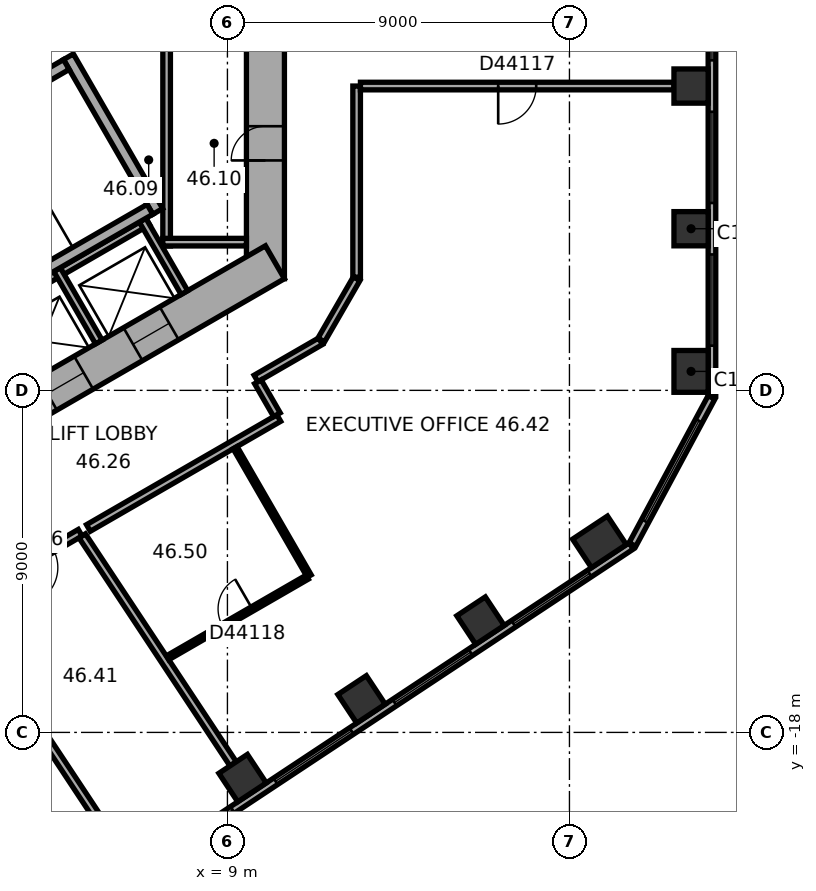
"""IFC4 building model, lengths in metres.
Left out: names, types, materials, properties, quantities, classifications, styles, units other than length and angle.
Written with IfcOpenShell. Run it as: python <this file> out.ifc"""

import sys

from ifc_helpers import new_model, si_unit, direction, frame, frame_2d, origin, origin_2d, place, context, subcontext, project, spatial, rectangle, extrude, element, fill, save


model = new_model("IFC4")
c1 = context("Model", 3, precision=1e-05, world=origin(), true_north=direction((0.0, 1.0)))
c2 = subcontext(c1, "Body", "Model", "MODEL_VIEW")
j1 = project(units=[si_unit("LENGTHUNIT", "METRE"), si_unit("PLANEANGLEUNIT", "RADIAN")], contexts=[c1])
p1 = place(None, origin())
s1 = spatial("IfcSite", under=j1, at=p1, CompositionType="ELEMENT")
p2 = place(p1, origin())
s2 = spatial("IfcBuilding", under=s1, at=p2, CompositionType="ELEMENT")
p3 = place(p2, frame((0.0, 0.0, 187.3)))
s3 = spatial("IfcBuildingStorey", under=s2, at=p3, CompositionType="ELEMENT", Elevation=187.3)
p4 = place(p3, frame((21.2, -8.501, 0.0), z_axis=(0.0, 0.0, 1.0), x_axis=(0.0, 1.0, 0.0)))
e1 = element("IfcColumn", 1, at=p4, inside=s3, PredefinedType="COLUMN", context=c2, shape_type="SweptSolid", body=[
    extrude(rectangle(XDim=1.1, YDim=0.9, at=origin_2d()), origin(), (0.0, 0.0, 1.0), 3.7),
])
for number, where, z_axis, x_axis in (
    (2, (21.2, -4.747, 0.0), (0.0, 0.0, 1.0), (0.0, 1.0, 0.0)),
    (3, (21.2, -0.993, 0.0), (0.0, 0.0, 1.0), (0.0, 1.0, 0.0)),
    (4, (9.398, -19.202, 0.0), (0.0, 0.0, 1.0), (0.834, 0.552, 0.0)),
    (5, (12.529, -17.13, 0.0), (0.0, 0.0, 1.0), (0.834, 0.552, 0.0)),
    (6, (15.659, -15.058, 0.0), (0.0, 0.0, 1.0), (0.834, 0.552, 0.0)),
):
    element("IfcColumn", number, at=place(p3, frame(where, z_axis=z_axis, x_axis=x_axis)), inside=s3, PredefinedType="COLUMN", context=c2, shape_type="SweptSolid", body=[
        extrude(rectangle(XDim=0.9, YDim=0.9, at=origin_2d()), origin(), (0.0, 0.0, 1.0), 3.7),
    ])
p5 = place(p3, frame((18.79, -12.986, 0.0), z_axis=(0.0, 0.0, 1.0), x_axis=(0.833885822067, 0.551936985312, 0.0)))
e7 = element("IfcColumn", 7, at=p5, inside=s3, PredefinedType="COLUMN", context=c2, shape_type="SweptSolid", body=[
    extrude(rectangle(XDim=1.1, YDim=0.9, at=origin_2d()), origin(), (0.0, 0.0, 1.0), 3.7),
])
p6 = place(p3, frame((10.0, -6.062, 0.0), z_axis=(0.0, 0.0, 1.0), x_axis=(0.0, 1.0, 0.0)))
e8 = element("IfcWall", 8, at=p6, inside=s3, PredefinedType="SHEAR", context=c2, shape_type="SweptSolid", body=[
    extrude(rectangle(XDim=12.125, YDim=1.0, at=frame_2d((6.062, 0.0))), origin(), (0.0, 0.0, 1.0), 3.7),
])
p7 = place(p6, frame((6.262, 0.0, 0.0)))
e9 = element("IfcOpeningElement", 9, at=p7, cuts=e8, PredefinedType="OPENING", context=c2, shape_type="SweptSolid", body=[
    extrude(rectangle(XDim=1.5, YDim=2.1, at=frame_2d((0.75, 1.05))), frame((0.0, 0.51, 0.0), z_axis=(0.0, -1.0, 0.0), x_axis=(1.0, 0.0, 0.0)), (0.0, 0.0, 1.0), 1.02),
])
p8 = place(p6, frame((3.112, 0.0, 0.0)))
e10 = element("IfcOpeningElement", 10, at=p8, cuts=e8, PredefinedType="OPENING", context=c2, shape_type="SweptSolid", body=[
    extrude(rectangle(XDim=0.9, YDim=2.1, at=frame_2d((0.45, 1.05))), frame((0.0, 0.51, 0.0), z_axis=(0.0, -1.0, 0.0), x_axis=(1.0, 0.0, 0.0)), (0.0, 0.0, 1.0), 1.02),
])
p9 = place(p3, frame((-0.25, -11.691, 0.0), z_axis=(0.0, 0.0, 1.0), x_axis=(0.866022616891, 0.50000482701, 0.0)))
e11 = element("IfcWall", 11, at=p9, inside=s3, PredefinedType="SHEAR", context=c2, shape_type="SweptSolid", body=[
    extrude(rectangle(XDim=12.125, YDim=1.0, at=frame_2d((6.062, 0.0))), origin(), (0.0, 0.0, 1.0), 3.7),
])
p10 = place(p9, frame((2.612, 0.0, 0.0)))
e12 = element("IfcOpeningElement", 12, at=p10, cuts=e11, PredefinedType="OPENING", context=c2, shape_type="SweptSolid", body=[
    extrude(rectangle(XDim=1.1, YDim=2.1, at=frame_2d((0.55, 1.05))), frame((0.0, 0.51, 0.0), z_axis=(0.0, -1.0, 0.0), x_axis=(1.0, 0.0, 0.0)), (0.0, 0.0, 1.0), 1.02),
])
p11 = place(p9, frame((5.212, 0.0, 0.0)))
e13 = element("IfcOpeningElement", 13, at=p11, cuts=e11, PredefinedType="OPENING", context=c2, shape_type="SweptSolid", body=[
    extrude(rectangle(XDim=1.1, YDim=2.1, at=frame_2d((0.55, 1.05))), frame((0.0, 0.51, 0.0), z_axis=(0.0, -1.0, 0.0), x_axis=(1.0, 0.0, 0.0)), (0.0, 0.0, 1.0), 1.02),
])
p12 = place(p9, frame((7.812, 0.0, 0.0)))
e14 = element("IfcOpeningElement", 14, at=p12, cuts=e11, PredefinedType="OPENING", context=c2, shape_type="SweptSolid", body=[
    extrude(rectangle(XDim=1.1, YDim=2.1, at=frame_2d((0.55, 1.05))), frame((0.0, 0.51, 0.0), z_axis=(0.0, -1.0, 0.0), x_axis=(1.0, 0.0, 0.0)), (0.0, 0.0, 1.0), 1.02),
])
p13 = place(p3, frame((21.75, -9.138, 0.0), z_axis=(0.0, 0.0, 1.0), x_axis=(0.0, 1.0, 0.0)))
e15 = element("IfcWall", 15, at=p13, inside=s3, PredefinedType="STANDARD", context=c2, shape_type="SweptSolid", body=[
    extrude(rectangle(XDim=20.044, YDim=0.2, at=frame_2d((10.022, 0.0))), origin(), (0.0, 0.0, 1.0), 3.7),
])
p14 = place(p13, frame((1.314, 0.0, 0.9)))
e16 = element("IfcOpeningElement", 16, at=p14, cuts=e15, PredefinedType="OPENING", context=c2, shape_type="SweptSolid", body=[
    extrude(rectangle(XDim=2.4, YDim=2.0, at=frame_2d((1.2, 1.0))), frame((0.0, 0.11, 0.0), z_axis=(0.0, -1.0, 0.0), x_axis=(1.0, 0.0, 0.0)), (0.0, 0.0, 1.0), 0.22),
])
p15 = place(p13, frame((5.069, 0.0, 0.9)))
e17 = element("IfcOpeningElement", 17, at=p15, cuts=e15, PredefinedType="OPENING", context=c2, shape_type="SweptSolid", body=[
    extrude(rectangle(XDim=2.4, YDim=2.0, at=frame_2d((1.2, 1.0))), frame((0.0, 0.11, 0.0), z_axis=(0.0, -1.0, 0.0), x_axis=(1.0, 0.0, 0.0)), (0.0, 0.0, 1.0), 0.22),
])
p16 = place(p13, frame((8.823, 0.0, 0.9)))
e18 = element("IfcOpeningElement", 18, at=p16, cuts=e15, PredefinedType="OPENING", context=c2, shape_type="SweptSolid", body=[
    extrude(rectangle(XDim=2.4, YDim=2.0, at=frame_2d((1.2, 1.0))), frame((0.0, 0.11, 0.0), z_axis=(0.0, -1.0, 0.0), x_axis=(1.0, 0.0, 0.0)), (0.0, 0.0, 1.0), 0.22),
])
p17 = place(p13, frame((12.577, 0.0, 0.9)))
e19 = element("IfcOpeningElement", 19, at=p17, cuts=e15, PredefinedType="OPENING", context=c2, shape_type="SweptSolid", body=[
    extrude(rectangle(XDim=2.4, YDim=2.0, at=frame_2d((1.2, 1.0))), frame((0.0, 0.11, 0.0), z_axis=(0.0, -1.0, 0.0), x_axis=(1.0, 0.0, 0.0)), (0.0, 0.0, 1.0), 0.22),
])
p18 = place(p13, frame((16.331, 0.0, 0.9)))
e20 = element("IfcOpeningElement", 20, at=p18, cuts=e15, PredefinedType="OPENING", context=c2, shape_type="SweptSolid", body=[
    extrude(rectangle(XDim=2.4, YDim=2.0, at=frame_2d((1.2, 1.0))), frame((0.0, 0.11, 0.0), z_axis=(0.0, -1.0, 0.0), x_axis=(1.0, 0.0, 0.0)), (0.0, 0.0, 1.0), 0.22),
])
p19 = place(p3, frame((2.911, -24.156, 0.0), z_axis=(0.0, 0.0, 1.0), x_axis=(0.833882163564, 0.551942512668, 0.0)))
e21 = element("IfcWall", 21, at=p19, inside=s3, PredefinedType="STANDARD", context=c2, shape_type="SweptSolid", body=[
    extrude(rectangle(XDim=20.044, YDim=0.2, at=frame_2d((10.022, 0.0))), origin(), (0.0, 0.0, 1.0), 3.7),
])
p20 = place(p19, frame((1.313, 0.0, 0.9)))
e22 = element("IfcOpeningElement", 22, at=p20, cuts=e21, PredefinedType="OPENING", context=c2, shape_type="SweptSolid", body=[
    extrude(rectangle(XDim=2.4, YDim=2.0, at=frame_2d((1.2, 1.0))), frame((0.0, 0.11, 0.0), z_axis=(0.0, -1.0, 0.0), x_axis=(1.0, 0.0, 0.0)), (0.0, 0.0, 1.0), 0.22),
])
p21 = place(p19, frame((5.067, 0.0, 0.9)))
e23 = element("IfcOpeningElement", 23, at=p21, cuts=e21, PredefinedType="OPENING", context=c2, shape_type="SweptSolid", body=[
    extrude(rectangle(XDim=2.4, YDim=2.0, at=frame_2d((1.2, 1.0))), frame((0.0, 0.11, 0.0), z_axis=(0.0, -1.0, 0.0), x_axis=(1.0, 0.0, 0.0)), (0.0, 0.0, 1.0), 0.22),
])
p22 = place(p19, frame((8.821, 0.0, 0.9)))
e24 = element("IfcOpeningElement", 24, at=p22, cuts=e21, PredefinedType="OPENING", context=c2, shape_type="SweptSolid", body=[
    extrude(rectangle(XDim=2.4, YDim=2.0, at=frame_2d((1.2, 1.0))), frame((0.0, 0.11, 0.0), z_axis=(0.0, -1.0, 0.0), x_axis=(1.0, 0.0, 0.0)), (0.0, 0.0, 1.0), 0.22),
])
p23 = place(p19, frame((12.575, 0.0, 0.9)))
e25 = element("IfcOpeningElement", 25, at=p23, cuts=e21, PredefinedType="OPENING", context=c2, shape_type="SweptSolid", body=[
    extrude(rectangle(XDim=2.4, YDim=2.0, at=frame_2d((1.2, 1.0))), frame((0.0, 0.11, 0.0), z_axis=(0.0, -1.0, 0.0), x_axis=(1.0, 0.0, 0.0)), (0.0, 0.0, 1.0), 0.22),
])
p24 = place(p19, frame((16.329, 0.0, 0.9)))
e26 = element("IfcOpeningElement", 26, at=p24, cuts=e21, PredefinedType="OPENING", context=c2, shape_type="SweptSolid", body=[
    extrude(rectangle(XDim=2.4, YDim=2.0, at=frame_2d((1.2, 1.0))), frame((0.0, 0.11, 0.0), z_axis=(0.0, -1.0, 0.0), x_axis=(1.0, 0.0, 0.0)), (0.0, 0.0, 1.0), 0.22),
])
p25 = place(p3, frame((19.658, -13.057, 0.0), z_axis=(0.0, 0.0, 1.0), x_axis=(0.473307879841, 0.880897071672, 0.0)))
e27 = element("IfcWall", 27, at=p25, inside=s3, PredefinedType="STANDARD", context=c2, shape_type="SweptSolid", body=[
    extrude(rectangle(XDim=4.395, YDim=0.2, at=frame_2d((2.197, 0.0))), origin(), (0.0, 0.0, 1.0), 3.7),
])
p26 = place(p25, frame((0.698, 0.0, 0.9)))
e28 = element("IfcOpeningElement", 28, at=p26, cuts=e27, PredefinedType="OPENING", context=c2, shape_type="SweptSolid", body=[
    extrude(rectangle(XDim=3.0, YDim=2.0, at=frame_2d((1.5, 1.0))), frame((0.0, 0.11, 0.0), z_axis=(0.0, -1.0, 0.0), x_axis=(1.0, 0.0, 0.0)), (0.0, 0.0, 1.0), 0.22),
])
p27 = place(p3, frame((7.4, -5.2, 0.0), z_axis=(0.0, 0.0, 1.0), x_axis=(0.0, 1.0, 0.0)))
e29 = element("IfcWall", 29, at=p27, inside=s3, PredefinedType="PARTITIONING", context=c2, shape_type="SweptSolid", body=[
    extrude(rectangle(XDim=5.4, YDim=0.2, at=frame_2d((2.7, 0.0))), origin(), (0.0, 0.0, 1.0), 3.42),
])
p28 = place(p3, frame((7.3, -5.1, 0.0), z_axis=(0.0, 0.0, 1.0), x_axis=(1.0, 0.0, 0.0)))
e30 = element("IfcWall", 30, at=p28, inside=s3, PredefinedType="PARTITIONING", context=c2, shape_type="SweptSolid", body=[
    extrude(rectangle(XDim=2.2, YDim=0.2, at=frame_2d((1.1, 0.0))), origin(), (0.0, 0.0, 1.0), 3.42),
])
p29 = place(p3, frame((-0.024, -8.559, 0.0), z_axis=(0.0, 0.0, 1.0), x_axis=(0.866026010844, 0.49999894854, 0.0)))
e31 = element("IfcWall", 31, at=p29, inside=s3, PredefinedType="PARTITIONING", context=c2, shape_type="SweptSolid", body=[
    extrude(rectangle(XDim=8.0, YDim=0.2, at=frame_2d((4.0, 0.0))), origin(), (0.0, 0.0, 1.0), 3.42),
])
for number, where, z_axis, x_axis in (
    (32, (4.516, -5.822, 0.0), (0.0, 0.0, 1.0), (0.5, -0.866, 0.0)),
    (33, (6.768, -4.522, 0.0), (0.0, 0.0, 1.0), (0.5, -0.866, 0.0)),
):
    element("IfcWall", number, at=place(p3, frame(where, z_axis=z_axis, x_axis=x_axis)), inside=s3, PredefinedType="PARTITIONING", context=c2, shape_type="SweptSolid", body=[
        extrude(rectangle(XDim=2.2, YDim=0.2, at=frame_2d((1.1, 0.0))), origin(), (0.0, 0.0, 1.0), 3.42),
    ])
p30 = place(p3, frame((4.816, -0.222, 0.0), z_axis=(0.0, 0.0, 1.0), x_axis=(0.499977259774, -0.866038532462, 0.0)))
e34 = element("IfcWall", 34, at=p30, inside=s3, PredefinedType="SHEAR", context=c2, shape_type="SweptSolid", body=[
    extrude(rectangle(XDim=4.7, YDim=0.3, at=frame_2d((2.35, 0.0))), origin(), (0.0, 0.0, 1.0), 3.42),
])
for number, where, z_axis, x_axis in (
    (35, (-1.353, -3.957, 0.0), (0.0, 0.0, 1.0), (0.866, 0.5, 0.0)),
    (36, (0.847, -7.767, 0.0), (0.0, 0.0, 1.0), (0.866, 0.5, 0.0)),
):
    element("IfcWall", number, at=place(p3, frame(where, z_axis=z_axis, x_axis=x_axis)), inside=s3, PredefinedType="SHEAR", context=c2, shape_type="SweptSolid", body=[
        extrude(rectangle(XDim=7.06, YDim=0.3, at=frame_2d((3.53, 0.0))), origin(), (0.0, 0.0, 1.0), 3.42),
    ])
p31 = place(p3, frame((2.816, -14.079, 0.0), z_axis=(0.0, 0.0, 1.0), x_axis=(0.866008705299, 0.50002892151, 0.0)))
e37 = element("IfcWall", 37, at=p31, inside=s3, PredefinedType="PARTITIONING", context=c2, shape_type="SweptSolid", body=[
    extrude(rectangle(XDim=2.666, YDim=0.2, at=frame_2d((1.333, 0.0))), origin(), (0.0, 0.0, 1.0), 3.42),
])
p32 = place(p31, frame((0.833, 0.0, 0.0)))
e38 = element("IfcOpeningElement", 38, at=p32, cuts=e37, PredefinedType="OPENING", context=c2, shape_type="SweptSolid", body=[
    extrude(rectangle(XDim=1.0, YDim=2.1, at=frame_2d((0.5, 1.05))), frame((0.0, 0.11, 0.0), z_axis=(0.0, -1.0, 0.0), x_axis=(1.0, 0.0, 0.0)), (0.0, 0.0, 1.0), 0.22),
])
p33 = place(p3, frame((5.342, -12.621, 0.0), z_axis=(0.0, 0.0, 1.0), x_axis=(0.866024665123, 0.500001279396, 0.0)))
e39 = element("IfcWall", 39, at=p33, inside=s3, PredefinedType="PARTITIONING", context=c2, shape_type="SweptSolid", body=[
    extrude(rectangle(XDim=5.786, YDim=0.2, at=frame_2d((2.893, 0.0))), origin(), (0.0, 0.0, 1.0), 3.42),
])
p34 = place(p3, frame((6.02, -20.899, 0.0), z_axis=(0.0, 0.0, 1.0), x_axis=(-0.551943990108, 0.833881185651, 0.0)))
e40 = element("IfcWall", 40, at=p34, inside=s3, PredefinedType="PARTITIONING", context=c2, shape_type="SweptSolid", body=[
    extrude(rectangle(XDim=8.615, YDim=0.2, at=frame_2d((4.308, 0.0))), origin(), (0.0, 0.0, 1.0), 3.42),
])
p35 = place(p3, frame((9.15, -18.827, 0.0), z_axis=(0.0, 0.0, 1.0), x_axis=(-0.551939801345, 0.833883958169, 0.0)))
e41 = element("IfcWall", 41, at=p35, inside=s3, PredefinedType="PARTITIONING", context=c2, shape_type="SweptSolid", body=[
    extrude(rectangle(XDim=7.192, YDim=0.2, at=frame_2d((3.596, 0.0))), origin(), (0.0, 0.0, 1.0), 2.87),
])
p36 = place(p3, frame((9.202, -10.508, 0.0), z_axis=(0.0, 0.0, 1.0), x_axis=(0.500043961785, -0.866000020948, 0.0)))
e42 = element("IfcWall", 42, at=p36, inside=s3, PredefinedType="PARTITIONING", context=c2, shape_type="SweptSolid", body=[
    extrude(rectangle(XDim=3.9, YDim=0.12, at=frame_2d((1.95, 0.0))), origin(), (0.0, 0.0, 1.0), 3.42),
])
p37 = place(p3, frame((9.752, -8.688, 0.0), z_axis=(0.0, 0.0, 1.0), x_axis=(0.865974105138, 0.500088841337, 0.0)))
e43 = element("IfcWall", 43, at=p37, inside=s3, PredefinedType="PARTITIONING", context=c2, shape_type="SweptSolid", body=[
    extrude(rectangle(XDim=1.961, YDim=0.2, at=frame_2d((0.98, 0.0))), origin(), (0.0, 0.0, 1.0), 3.42),
])
p38 = place(p3, frame((10.302, -9.642, 0.0), z_axis=(0.0, 0.0, 1.0), x_axis=(-0.500074377092, 0.865982457891, 0.0)))
e44 = element("IfcWall", 44, at=p38, inside=s3, PredefinedType="PARTITIONING", context=c2, shape_type="SweptSolid", body=[
    extrude(rectangle(XDim=1.001, YDim=0.2, at=frame_2d((0.5, 0.0))), origin(), (0.0, 0.0, 1.0), 3.42),
])
p39 = place(p3, frame((11.1, -13.915, 0.0), z_axis=(0.0, 0.0, 1.0), x_axis=(-0.866048475386, -0.499960036685, 0.0)))
e45 = element("IfcWall", 45, at=p39, inside=s3, PredefinedType="PARTITIONING", context=c2, shape_type="SweptSolid", body=[
    extrude(rectangle(XDim=4.24, YDim=0.12, at=frame_2d((2.12, 0.0))), origin(), (0.0, 0.0, 1.0), 3.42),
])
p40 = place(p39, frame((1.67, 0.0, 0.0)))
e46 = element("IfcOpeningElement", 46, at=p40, cuts=e45, PredefinedType="OPENING", context=c2, shape_type="SweptSolid", body=[
    extrude(rectangle(XDim=0.9, YDim=2.1, at=frame_2d((0.45, 1.05))), frame((0.0, 0.07, 0.0), z_axis=(0.0, -1.0, 0.0), x_axis=(1.0, 0.0, 0.0)), (0.0, 0.0, 1.0), 0.14),
])
p41 = place(p3, frame((11.47, -7.673, 0.0), z_axis=(0.0, 0.0, 1.0), x_axis=(0.499964847546, 0.866045698112, 0.0)))
e47 = element("IfcWall", 47, at=p41, inside=s3, PredefinedType="PARTITIONING", context=c2, shape_type="SweptSolid", body=[
    extrude(rectangle(XDim=1.86, YDim=0.2, at=frame_2d((0.93, 0.0))), origin(), (0.0, 0.0, 1.0), 3.42),
])
p42 = place(p3, frame((12.4, -6.022, 0.0), z_axis=(0.0, 0.0, 1.0), x_axis=(0.0, 1.0, 0.0)))
e48 = element("IfcWall", 48, at=p42, inside=s3, PredefinedType="PARTITIONING", context=c2, shape_type="SweptSolid", body=[
    extrude(rectangle(XDim=5.029, YDim=0.2, at=frame_2d((2.515, 0.0))), origin(), (0.0, 0.0, 1.0), 3.42),
])
p43 = place(p3, frame((12.5, -0.993, 0.0), z_axis=(0.0, 0.0, 1.0), x_axis=(1.0, 0.0, 0.0)))
e49 = element("IfcWall", 49, at=p43, inside=s3, PredefinedType="PARTITIONING", context=c2, shape_type="SweptSolid", body=[
    extrude(rectangle(XDim=8.25, YDim=0.2, at=frame_2d((4.125, 0.0))), origin(), (0.0, 0.0, 1.0), 2.87),
])
p44 = place(p43, frame((3.625, 0.0, 0.0)))
e50 = element("IfcOpeningElement", 50, at=p44, cuts=e49, PredefinedType="OPENING", context=c2, shape_type="SweptSolid", body=[
    extrude(rectangle(XDim=1.0, YDim=2.1, at=frame_2d((0.5, 1.05))), frame((0.0, 0.11, 0.0), z_axis=(0.0, -1.0, 0.0), x_axis=(1.0, 0.0, 0.0)), (0.0, 0.0, 1.0), 0.22),
])
p45 = place(p14, origin())
e51 = element("IfcWindow", 51, at=p45, inside=s3, PartitioningType="SINGLE_PANEL", PredefinedType="WINDOW", context=c2, shape_type="SweptSolid", body=[
    extrude(rectangle(XDim=2.4, YDim=2.0, at=frame_2d((1.2, 1.0))), frame((0.0, 0.03, 0.0), z_axis=(0.0, -1.0, 0.0), x_axis=(1.0, 0.0, 0.0)), (0.0, 0.0, 1.0), 0.06),
])
fill(e16, e51)
p46 = place(p15, origin())
e52 = element("IfcWindow", 52, at=p46, inside=s3, PartitioningType="SINGLE_PANEL", PredefinedType="WINDOW", context=c2, shape_type="SweptSolid", body=[
    extrude(rectangle(XDim=2.4, YDim=2.0, at=frame_2d((1.2, 1.0))), frame((0.0, 0.03, 0.0), z_axis=(0.0, -1.0, 0.0), x_axis=(1.0, 0.0, 0.0)), (0.0, 0.0, 1.0), 0.06),
])
fill(e17, e52)
p47 = place(p16, origin())
e53 = element("IfcWindow", 53, at=p47, inside=s3, PartitioningType="SINGLE_PANEL", PredefinedType="WINDOW", context=c2, shape_type="SweptSolid", body=[
    extrude(rectangle(XDim=2.4, YDim=2.0, at=frame_2d((1.2, 1.0))), frame((0.0, 0.03, 0.0), z_axis=(0.0, -1.0, 0.0), x_axis=(1.0, 0.0, 0.0)), (0.0, 0.0, 1.0), 0.06),
])
fill(e18, e53)
p48 = place(p21, origin())
e54 = element("IfcWindow", 54, at=p48, inside=s3, PartitioningType="SINGLE_PANEL", PredefinedType="WINDOW", context=c2, shape_type="SweptSolid", body=[
    extrude(rectangle(XDim=2.4, YDim=2.0, at=frame_2d((1.2, 1.0))), frame((0.0, 0.03, 0.0), z_axis=(0.0, -1.0, 0.0), x_axis=(1.0, 0.0, 0.0)), (0.0, 0.0, 1.0), 0.06),
])
fill(e23, e54)
p49 = place(p22, origin())
e55 = element("IfcWindow", 55, at=p49, inside=s3, PartitioningType="SINGLE_PANEL", PredefinedType="WINDOW", context=c2, shape_type="SweptSolid", body=[
    extrude(rectangle(XDim=2.4, YDim=2.0, at=frame_2d((1.2, 1.0))), frame((0.0, 0.03, 0.0), z_axis=(0.0, -1.0, 0.0), x_axis=(1.0, 0.0, 0.0)), (0.0, 0.0, 1.0), 0.06),
])
fill(e24, e55)
p50 = place(p23, origin())
e56 = element("IfcWindow", 56, at=p50, inside=s3, PartitioningType="SINGLE_PANEL", PredefinedType="WINDOW", context=c2, shape_type="SweptSolid", body=[
    extrude(rectangle(XDim=2.4, YDim=2.0, at=frame_2d((1.2, 1.0))), frame((0.0, 0.03, 0.0), z_axis=(0.0, -1.0, 0.0), x_axis=(1.0, 0.0, 0.0)), (0.0, 0.0, 1.0), 0.06),
])
fill(e25, e56)
p51 = place(p24, origin())
e57 = element("IfcWindow", 57, at=p51, inside=s3, PartitioningType="SINGLE_PANEL", PredefinedType="WINDOW", context=c2, shape_type="SweptSolid", body=[
    extrude(rectangle(XDim=2.4, YDim=2.0, at=frame_2d((1.2, 1.0))), frame((0.0, 0.03, 0.0), z_axis=(0.0, -1.0, 0.0), x_axis=(1.0, 0.0, 0.0)), (0.0, 0.0, 1.0), 0.06),
])
fill(e26, e57)
p52 = place(p26, origin())
e58 = element("IfcWindow", 58, at=p52, inside=s3, PartitioningType="SINGLE_PANEL", PredefinedType="WINDOW", context=c2, shape_type="SweptSolid", body=[
    extrude(rectangle(XDim=3.0, YDim=2.0, at=frame_2d((1.5, 1.0))), frame((0.0, 0.03, 0.0), z_axis=(0.0, -1.0, 0.0), x_axis=(1.0, 0.0, 0.0)), (0.0, 0.0, 1.0), 0.06),
])
fill(e28, e58)
p53 = place(p8, origin())
e59 = element("IfcDoor", 59, at=p53, inside=s3, OperationType="SINGLE_SWING_LEFT", PredefinedType="DOOR", context=c2, shape_type="SweptSolid", body=[
    extrude(rectangle(XDim=0.9, YDim=2.1, at=frame_2d((0.45, 1.05))), frame((0.0, 0.025, 0.0), z_axis=(0.0, -1.0, 0.0), x_axis=(1.0, 0.0, 0.0)), (0.0, 0.0, 1.0), 0.05),
])
fill(e10, e59)
p54 = place(p11, origin())
e60 = element("IfcDoor", 60, at=p54, inside=s3, OperationType="DOUBLE_DOOR_SLIDING", PredefinedType="DOOR", context=c2, shape_type="SweptSolid", body=[
    extrude(rectangle(XDim=1.1, YDim=2.1, at=frame_2d((0.55, 1.05))), frame((0.0, 0.025, 0.0), z_axis=(0.0, -1.0, 0.0), x_axis=(1.0, 0.0, 0.0)), (0.0, 0.0, 1.0), 0.05),
])
fill(e13, e60)
p55 = place(p12, origin())
e61 = element("IfcDoor", 61, at=p55, inside=s3, OperationType="DOUBLE_DOOR_SLIDING", PredefinedType="DOOR", context=c2, shape_type="SweptSolid", body=[
    extrude(rectangle(XDim=1.1, YDim=2.1, at=frame_2d((0.55, 1.05))), frame((0.0, 0.025, 0.0), z_axis=(0.0, -1.0, 0.0), x_axis=(1.0, 0.0, 0.0)), (0.0, 0.0, 1.0), 0.05),
])
fill(e14, e61)
p56 = place(p32, origin())
e62 = element("IfcDoor", 62, at=p56, inside=s3, OperationType="SINGLE_SWING_LEFT", PredefinedType="DOOR", context=c2, shape_type="SweptSolid", body=[
    extrude(rectangle(XDim=1.0, YDim=2.1, at=frame_2d((0.5, 1.05))), frame((0.0, 0.025, 0.0), z_axis=(0.0, -1.0, 0.0), x_axis=(1.0, 0.0, 0.0)), (0.0, 0.0, 1.0), 0.05),
])
fill(e38, e62)
p57 = place(p44, origin())
e63 = element("IfcDoor", 63, at=p57, inside=s3, OperationType="SINGLE_SWING_LEFT", PredefinedType="DOOR", context=c2, shape_type="SweptSolid", body=[
    extrude(rectangle(XDim=1.0, YDim=2.1, at=frame_2d((0.5, 1.05))), frame((0.0, 0.025, 0.0), z_axis=(0.0, -1.0, 0.0), x_axis=(1.0, 0.0, 0.0)), (0.0, 0.0, 1.0), 0.05),
])
fill(e50, e63)
p58 = place(p40, origin())
e64 = element("IfcDoor", 64, at=p58, inside=s3, OperationType="SINGLE_SWING_LEFT", PredefinedType="DOOR", context=c2, shape_type="SweptSolid", body=[
    extrude(rectangle(XDim=0.9, YDim=2.1, at=frame_2d((0.45, 1.05))), frame((0.0, 0.025, 0.0), z_axis=(0.0, -1.0, 0.0), x_axis=(1.0, 0.0, 0.0)), (0.0, 0.0, 1.0), 0.05),
])
fill(e46, e64)
save(model, sys.argv[1])
